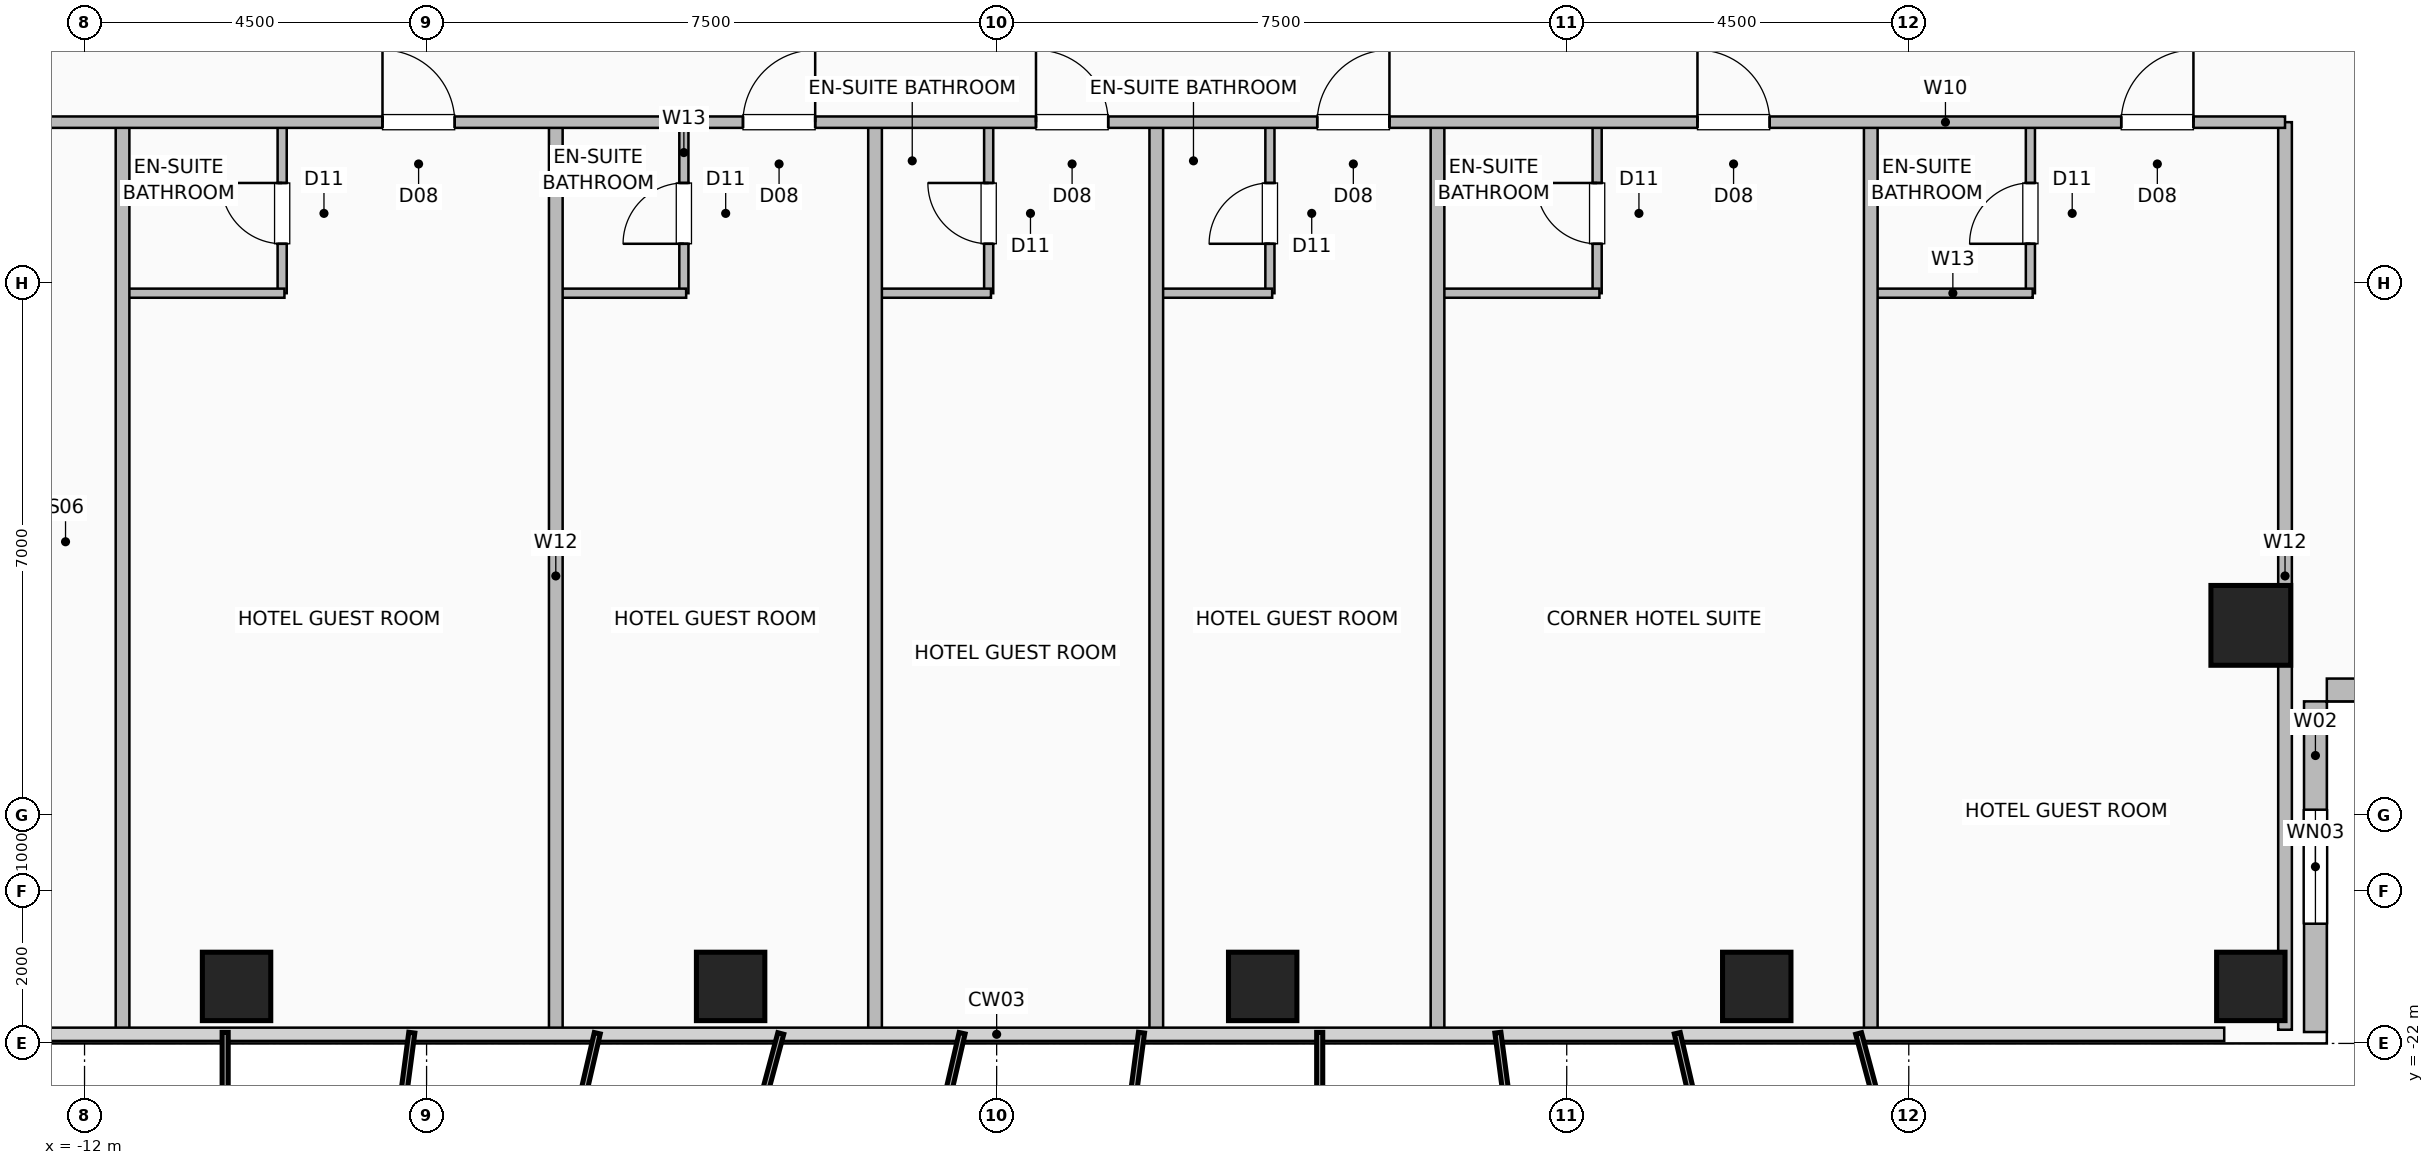
"""IFC4 building model, lengths in metres.
Left out: names, types, materials, properties, quantities, classifications, styles, units other than length and angle.
Written with IfcOpenShell. Run it as: python <this file> out.ifc"""

import sys

from ifc_helpers import new_model, si_unit, direction, frame, frame_2d, origin, origin_2d, place, context, subcontext, project, spatial, rectangle, hollow_rectangle, extrude, element, fill, save


model = new_model("IFC4")
c1 = context("Model", 3, precision=1e-05, world=origin(), true_north=direction((0.0, 1.0)))
c2 = subcontext(c1, "Body", "Model", "MODEL_VIEW")
j1 = project(units=[si_unit("LENGTHUNIT", "METRE"), si_unit("PLANEANGLEUNIT", "RADIAN")], contexts=[c1])
p1 = place(None, origin())
s1 = spatial("IfcSite", under=j1, at=p1, CompositionType="ELEMENT")
p2 = place(p1, origin())
s2 = spatial("IfcBuilding", under=s1, at=p2, CompositionType="ELEMENT")
p3 = place(p2, frame((0.0, 0.0, 148.0)))
s3 = spatial("IfcBuildingStorey", under=s2, at=p3, CompositionType="ELEMENT", Elevation=148.0)
for number, where, z_axis, x_axis in (
    (1, (-10.0, -21.25, 0.0), (0.0, 0.0, 1.0), (1.0, 0.0, 0.0)),
    (2, (-3.5, -21.25, 0.0), (0.0, 0.0, 1.0), (1.0, 0.0, 0.0)),
    (3, (3.5, -21.25, 0.0), (0.0, 0.0, 1.0), (1.0, 0.0, 0.0)),
    (4, (10.0, -21.25, 0.0), (0.0, 0.0, 1.0), (1.0, 0.0, 0.0)),
    (5, (16.5, -21.25, 0.0), (0.0, 0.0, 1.0), (1.0, 0.0, 0.0)),
):
    element("IfcColumn", number, at=place(p3, frame(where, z_axis=z_axis, x_axis=x_axis)), inside=s3, PredefinedType="COLUMN", context=c2, shape_type="SweptSolid", body=[
        extrude(hollow_rectangle(XDim=0.9, YDim=0.9, WallThickness=0.045, at=origin_2d()), origin(), (0.0, 0.0, 1.0), 3.6),
    ])
p4 = place(p3, frame((16.5, -16.5, 0.0), z_axis=(0.0, 0.0, 1.0), x_axis=(1.0, 0.0, 0.0)))
e6 = element("IfcColumn", 6, at=p4, inside=s3, PredefinedType="COLUMN", context=c2, shape_type="SweptSolid", body=[
    extrude(hollow_rectangle(XDim=1.05, YDim=1.05, WallThickness=0.05, at=origin_2d()), origin(), (0.0, 0.0, 1.0), 3.6),
])
p5 = place(p3, frame((17.35, -21.85, 0.0), z_axis=(0.0, 0.0, 1.0), x_axis=(0.0, 1.0, 0.0)))
e7 = element("IfcWall", 7, at=p5, inside=s3, PredefinedType="SOLIDWALL", context=c2, shape_type="SweptSolid", body=[
    extrude(rectangle(XDim=4.35, YDim=0.3, at=frame_2d((2.175, 0.0))), origin(), (0.0, 0.0, 1.0), 3.36),
])
p6 = place(p5, frame((1.425, 0.0, 0.9)))
e8 = element("IfcOpeningElement", 8, at=p6, cuts=e7, PredefinedType="OPENING", context=c2, shape_type="SweptSolid", body=[
    extrude(rectangle(XDim=1.5, YDim=1.8, at=frame_2d((0.75, 0.9))), frame((0.0, 0.16, 0.0), z_axis=(0.0, -1.0, 0.0), x_axis=(1.0, 0.0, 0.0)), (0.0, 0.0, 1.0), 0.32),
])
p7 = place(p3, frame((21.85, -17.35, 0.0), z_axis=(0.0, 0.0, 1.0), x_axis=(-1.0, 0.0, 0.0)))
e9 = element("IfcWall", 9, at=p7, inside=s3, PredefinedType="SOLIDWALL", context=c2, shape_type="SweptSolid", body=[
    extrude(rectangle(XDim=4.35, YDim=0.3, at=frame_2d((2.175, 0.0))), origin(), (0.0, 0.0, 1.0), 3.36),
])
p8 = place(p3, frame((-9.4, -12.13, 0.0), z_axis=(0.0, 0.0, 1.0), x_axis=(0.0, 1.0, 0.0)))
e10 = element("IfcWall", 10, at=p8, inside=s3, PredefinedType="PLUMBINGWALL", context=c2, shape_type="SweptSolid", body=[
    extrude(rectangle(XDim=2.25, YDim=0.12, at=frame_2d((1.125, 0.0))), origin(), (0.0, 0.0, 1.0), 3.36),
])
p9 = place(p8, frame((0.65, 0.0, 0.0)))
e11 = element("IfcOpeningElement", 11, at=p9, cuts=e10, PredefinedType="OPENING", context=c2, shape_type="SweptSolid", body=[
    extrude(rectangle(XDim=0.8, YDim=2.05, at=frame_2d((0.4, 1.025))), frame((0.0, 0.07, 0.0), z_axis=(0.0, -1.0, 0.0), x_axis=(1.0, 0.0, 0.0)), (0.0, 0.0, 1.0), 0.14),
])
p10 = place(p3, frame((-11.47, -12.13, 0.0), z_axis=(0.0, 0.0, 1.0), x_axis=(1.0, 0.0, 0.0)))
e12 = element("IfcWall", 12, at=p10, inside=s3, PredefinedType="PLUMBINGWALL", context=c2, shape_type="SweptSolid", body=[
    extrude(rectangle(XDim=2.1, YDim=0.12, at=frame_2d((1.05, 0.0))), origin(), (0.0, 0.0, 1.0), 3.36),
])
p11 = place(p3, frame((-4.115, -12.13, 0.0), z_axis=(0.0, 0.0, 1.0), x_axis=(0.0, 1.0, 0.0)))
e13 = element("IfcWall", 13, at=p11, inside=s3, PredefinedType="PLUMBINGWALL", context=c2, shape_type="SweptSolid", body=[
    extrude(rectangle(XDim=2.25, YDim=0.12, at=frame_2d((1.125, 0.0))), origin(), (0.0, 0.0, 1.0), 3.36),
])
p12 = place(p11, frame((0.65, 0.0, 0.0)))
e14 = element("IfcOpeningElement", 14, at=p12, cuts=e13, PredefinedType="OPENING", context=c2, shape_type="SweptSolid", body=[
    extrude(rectangle(XDim=0.8, YDim=2.05, at=frame_2d((0.4, 1.025))), frame((0.0, 0.07, 0.0), z_axis=(0.0, -1.0, 0.0), x_axis=(1.0, 0.0, 0.0)), (0.0, 0.0, 1.0), 0.14),
])
p13 = place(p3, frame((-5.77, -12.13, 0.0), z_axis=(0.0, 0.0, 1.0), x_axis=(1.0, 0.0, 0.0)))
e15 = element("IfcWall", 15, at=p13, inside=s3, PredefinedType="PLUMBINGWALL", context=c2, shape_type="SweptSolid", body=[
    extrude(rectangle(XDim=1.685, YDim=0.12, at=frame_2d((0.843, 0.0))), origin(), (0.0, 0.0, 1.0), 3.36),
])
p14 = place(p3, frame((-0.105, -12.13, 0.0), z_axis=(0.0, 0.0, 1.0), x_axis=(0.0, 1.0, 0.0)))
e16 = element("IfcWall", 16, at=p14, inside=s3, PredefinedType="PLUMBINGWALL", context=c2, shape_type="SweptSolid", body=[
    extrude(rectangle(XDim=2.25, YDim=0.12, at=frame_2d((1.125, 0.0))), origin(), (0.0, 0.0, 1.0), 3.36),
])
p15 = place(p14, frame((0.65, 0.0, 0.0)))
e17 = element("IfcOpeningElement", 17, at=p15, cuts=e16, PredefinedType="OPENING", context=c2, shape_type="SweptSolid", body=[
    extrude(rectangle(XDim=0.8, YDim=2.05, at=frame_2d((0.4, 1.025))), frame((0.0, 0.07, 0.0), z_axis=(0.0, -1.0, 0.0), x_axis=(1.0, 0.0, 0.0)), (0.0, 0.0, 1.0), 0.14),
])
p16 = place(p3, frame((-1.57, -12.13, 0.0), z_axis=(0.0, 0.0, 1.0), x_axis=(1.0, 0.0, 0.0)))
e18 = element("IfcWall", 18, at=p16, inside=s3, PredefinedType="PLUMBINGWALL", context=c2, shape_type="SweptSolid", body=[
    extrude(rectangle(XDim=1.495, YDim=0.12, at=frame_2d((0.748, 0.0))), origin(), (0.0, 0.0, 1.0), 3.36),
])
p17 = place(p3, frame((3.595, -12.13, 0.0), z_axis=(0.0, 0.0, 1.0), x_axis=(0.0, 1.0, 0.0)))
e19 = element("IfcWall", 19, at=p17, inside=s3, PredefinedType="PLUMBINGWALL", context=c2, shape_type="SweptSolid", body=[
    extrude(rectangle(XDim=2.25, YDim=0.12, at=frame_2d((1.125, 0.0))), origin(), (0.0, 0.0, 1.0), 2.718),
])
p18 = place(p17, frame((0.65, 0.0, 0.0)))
e20 = element("IfcOpeningElement", 20, at=p18, cuts=e19, PredefinedType="OPENING", context=c2, shape_type="SweptSolid", body=[
    extrude(rectangle(XDim=0.8, YDim=2.05, at=frame_2d((0.4, 1.025))), frame((0.0, 0.07, 0.0), z_axis=(0.0, -1.0, 0.0), x_axis=(1.0, 0.0, 0.0)), (0.0, 0.0, 1.0), 0.14),
])
p19 = place(p3, frame((2.13, -12.13, 0.0), z_axis=(0.0, 0.0, 1.0), x_axis=(1.0, 0.0, 0.0)))
e21 = element("IfcWall", 21, at=p19, inside=s3, PredefinedType="PLUMBINGWALL", context=c2, shape_type="SweptSolid", body=[
    extrude(rectangle(XDim=1.495, YDim=0.12, at=frame_2d((0.748, 0.0))), origin(), (0.0, 0.0, 1.0), 3.36),
])
p20 = place(p3, frame((7.9, -12.13, 0.0), z_axis=(0.0, 0.0, 1.0), x_axis=(0.0, 1.0, 0.0)))
e22 = element("IfcWall", 22, at=p20, inside=s3, PredefinedType="PLUMBINGWALL", context=c2, shape_type="SweptSolid", body=[
    extrude(rectangle(XDim=2.25, YDim=0.12, at=frame_2d((1.125, 0.0))), origin(), (0.0, 0.0, 1.0), 3.36),
])
p21 = place(p20, frame((0.65, 0.0, 0.0)))
e23 = element("IfcOpeningElement", 23, at=p21, cuts=e22, PredefinedType="OPENING", context=c2, shape_type="SweptSolid", body=[
    extrude(rectangle(XDim=0.8, YDim=2.05, at=frame_2d((0.4, 1.025))), frame((0.0, 0.07, 0.0), z_axis=(0.0, -1.0, 0.0), x_axis=(1.0, 0.0, 0.0)), (0.0, 0.0, 1.0), 0.14),
])
p22 = place(p3, frame((5.83, -12.13, 0.0), z_axis=(0.0, 0.0, 1.0), x_axis=(1.0, 0.0, 0.0)))
e24 = element("IfcWall", 24, at=p22, inside=s3, PredefinedType="PLUMBINGWALL", context=c2, shape_type="SweptSolid", body=[
    extrude(rectangle(XDim=2.1, YDim=0.12, at=frame_2d((1.05, 0.0))), origin(), (0.0, 0.0, 1.0), 3.36),
])
p23 = place(p3, frame((13.6, -12.13, 0.0), z_axis=(0.0, 0.0, 1.0), x_axis=(0.0, 1.0, 0.0)))
e25 = element("IfcWall", 25, at=p23, inside=s3, PredefinedType="PLUMBINGWALL", context=c2, shape_type="SweptSolid", body=[
    extrude(rectangle(XDim=2.25, YDim=0.12, at=frame_2d((1.125, 0.0))), origin(), (0.0, 0.0, 1.0), 3.36),
])
p24 = place(p23, frame((0.65, 0.0, 0.0)))
e26 = element("IfcOpeningElement", 26, at=p24, cuts=e25, PredefinedType="OPENING", context=c2, shape_type="SweptSolid", body=[
    extrude(rectangle(XDim=0.8, YDim=2.05, at=frame_2d((0.4, 1.025))), frame((0.0, 0.07, 0.0), z_axis=(0.0, -1.0, 0.0), x_axis=(1.0, 0.0, 0.0)), (0.0, 0.0, 1.0), 0.14),
])
p25 = place(p3, frame((11.53, -12.13, 0.0), z_axis=(0.0, 0.0, 1.0), x_axis=(1.0, 0.0, 0.0)))
e27 = element("IfcWall", 27, at=p25, inside=s3, PredefinedType="PLUMBINGWALL", context=c2, shape_type="SweptSolid", body=[
    extrude(rectangle(XDim=2.1, YDim=0.12, at=frame_2d((1.05, 0.0))), origin(), (0.0, 0.0, 1.0), 3.36),
])
for number, where, z_axis, x_axis in (
    (28, (-11.5, -21.82, 0.0), (0.0, 0.0, 1.0), (0.0, 1.0, 0.0)),
    (29, (-5.8, -21.82, 0.0), (0.0, 0.0, 1.0), (0.0, 1.0, 0.0)),
    (30, (-1.6, -21.82, 0.0), (0.0, 0.0, 1.0), (0.0, 1.0, 0.0)),
    (31, (2.1, -21.82, 0.0), (0.0, 0.0, 1.0), (0.0, 1.0, 0.0)),
    (32, (5.8, -21.82, 0.0), (0.0, 0.0, 1.0), (0.0, 1.0, 0.0)),
    (33, (11.5, -21.82, 0.0), (0.0, 0.0, 1.0), (0.0, 1.0, 0.0)),
    (34, (16.95, -21.82, 0.0), (0.0, 0.0, 1.0), (0.0, 1.0, 0.0)),
):
    element("IfcWall", number, at=place(p3, frame(where, z_axis=z_axis, x_axis=x_axis)), inside=s3, PredefinedType="PARTITIONING", context=c2, shape_type="SweptSolid", body=[
        extrude(rectangle(XDim=11.94, YDim=0.18, at=frame_2d((5.97, 0.0))), origin(), (0.0, 0.0, 1.0), 3.36),
    ])
p26 = place(p3, frame((-16.95, -9.88, 0.0), z_axis=(0.0, 0.0, 1.0), x_axis=(1.0, 0.0, 0.0)))
e35 = element("IfcWall", 35, at=p26, inside=s3, PredefinedType="PARTITIONING", context=c2, shape_type="SweptSolid", body=[
    extrude(rectangle(XDim=33.9, YDim=0.15, at=frame_2d((16.95, 0.0))), origin(), (0.0, 0.0, 1.0), 3.36),
])
p27 = place(p26, frame((3.295, 0.0, 0.0)))
e36 = element("IfcOpeningElement", 36, at=p27, cuts=e35, PredefinedType="OPENING", context=c2, shape_type="SweptSolid", body=[
    extrude(rectangle(XDim=0.95, YDim=2.08, at=frame_2d((0.475, 1.04))), frame((0.0, 0.085, 0.0), z_axis=(0.0, -1.0, 0.0), x_axis=(1.0, 0.0, 0.0)), (0.0, 0.0, 1.0), 0.17),
])
p28 = place(p26, frame((8.87, 0.0, 0.0)))
e37 = element("IfcOpeningElement", 37, at=p28, cuts=e35, PredefinedType="OPENING", context=c2, shape_type="SweptSolid", body=[
    extrude(rectangle(XDim=0.95, YDim=2.08, at=frame_2d((0.475, 1.04))), frame((0.0, 0.085, 0.0), z_axis=(0.0, -1.0, 0.0), x_axis=(1.0, 0.0, 0.0)), (0.0, 0.0, 1.0), 0.17),
])
p29 = place(p26, frame((13.613, 0.0, 0.0)))
e38 = element("IfcOpeningElement", 38, at=p29, cuts=e35, PredefinedType="OPENING", context=c2, shape_type="SweptSolid", body=[
    extrude(rectangle(XDim=0.95, YDim=2.08, at=frame_2d((0.475, 1.04))), frame((0.0, 0.085, 0.0), z_axis=(0.0, -1.0, 0.0), x_axis=(1.0, 0.0, 0.0)), (0.0, 0.0, 1.0), 0.17),
])
p30 = place(p26, frame((17.468, 0.0, 0.0)))
e39 = element("IfcOpeningElement", 39, at=p30, cuts=e35, PredefinedType="OPENING", context=c2, shape_type="SweptSolid", body=[
    extrude(rectangle(XDim=0.95, YDim=2.08, at=frame_2d((0.475, 1.04))), frame((0.0, 0.085, 0.0), z_axis=(0.0, -1.0, 0.0), x_axis=(1.0, 0.0, 0.0)), (0.0, 0.0, 1.0), 0.17),
])
p31 = place(p26, frame((21.167, 0.0, 0.0)))
e40 = element("IfcOpeningElement", 40, at=p31, cuts=e35, PredefinedType="OPENING", context=c2, shape_type="SweptSolid", body=[
    extrude(rectangle(XDim=0.95, YDim=2.08, at=frame_2d((0.475, 1.04))), frame((0.0, 0.085, 0.0), z_axis=(0.0, -1.0, 0.0), x_axis=(1.0, 0.0, 0.0)), (0.0, 0.0, 1.0), 0.17),
])
p32 = place(p26, frame((26.17, 0.0, 0.0)))
e41 = element("IfcOpeningElement", 41, at=p32, cuts=e35, PredefinedType="OPENING", context=c2, shape_type="SweptSolid", body=[
    extrude(rectangle(XDim=0.95, YDim=2.08, at=frame_2d((0.475, 1.04))), frame((0.0, 0.085, 0.0), z_axis=(0.0, -1.0, 0.0), x_axis=(1.0, 0.0, 0.0)), (0.0, 0.0, 1.0), 0.17),
])
p33 = place(p26, frame((31.745, 0.0, 0.0)))
e42 = element("IfcOpeningElement", 42, at=p33, cuts=e35, PredefinedType="OPENING", context=c2, shape_type="SweptSolid", body=[
    extrude(rectangle(XDim=0.95, YDim=2.08, at=frame_2d((0.475, 1.04))), frame((0.0, 0.085, 0.0), z_axis=(0.0, -1.0, 0.0), x_axis=(1.0, 0.0, 0.0)), (0.0, 0.0, 1.0), 0.17),
])
p34 = place(p6, origin())
e43 = element("IfcWindow", 43, at=p34, inside=s3, PartitioningType="SINGLE_PANEL", PredefinedType="WINDOW", context=c2, shape_type="SweptSolid", body=[
    extrude(rectangle(XDim=1.5, YDim=1.8, at=frame_2d((0.75, 0.9))), frame((0.0, 0.03, 0.0), z_axis=(0.0, -1.0, 0.0), x_axis=(1.0, 0.0, 0.0)), (0.0, 0.0, 1.0), 0.06),
])
fill(e8, e43)
p35 = place(p9, origin())
e44 = element("IfcDoor", 44, at=p35, inside=s3, OperationType="SINGLE_SWING_RIGHT", PredefinedType="DOOR", context=c2, shape_type="SweptSolid", body=[
    extrude(rectangle(XDim=0.8, YDim=2.05, at=frame_2d((0.4, 1.025))), frame((0.0, 0.025, 0.0), z_axis=(0.0, -1.0, 0.0), x_axis=(1.0, 0.0, 0.0)), (0.0, 0.0, 1.0), 0.05),
])
fill(e11, e44)
p36 = place(p12, origin())
e45 = element("IfcDoor", 45, at=p36, inside=s3, OperationType="SINGLE_SWING_LEFT", PredefinedType="DOOR", context=c2, shape_type="SweptSolid", body=[
    extrude(rectangle(XDim=0.8, YDim=2.05, at=frame_2d((0.4, 1.025))), frame((0.0, 0.025, 0.0), z_axis=(0.0, -1.0, 0.0), x_axis=(1.0, 0.0, 0.0)), (0.0, 0.0, 1.0), 0.05),
])
fill(e14, e45)
p37 = place(p15, origin())
e46 = element("IfcDoor", 46, at=p37, inside=s3, OperationType="SINGLE_SWING_RIGHT", PredefinedType="DOOR", context=c2, shape_type="SweptSolid", body=[
    extrude(rectangle(XDim=0.8, YDim=2.05, at=frame_2d((0.4, 1.025))), frame((0.0, 0.025, 0.0), z_axis=(0.0, -1.0, 0.0), x_axis=(1.0, 0.0, 0.0)), (0.0, 0.0, 1.0), 0.05),
])
fill(e17, e46)
p38 = place(p18, origin())
e47 = element("IfcDoor", 47, at=p38, inside=s3, OperationType="SINGLE_SWING_LEFT", PredefinedType="DOOR", context=c2, shape_type="SweptSolid", body=[
    extrude(rectangle(XDim=0.8, YDim=2.05, at=frame_2d((0.4, 1.025))), frame((0.0, 0.025, 0.0), z_axis=(0.0, -1.0, 0.0), x_axis=(1.0, 0.0, 0.0)), (0.0, 0.0, 1.0), 0.05),
])
fill(e20, e47)
p39 = place(p21, origin())
e48 = element("IfcDoor", 48, at=p39, inside=s3, OperationType="SINGLE_SWING_RIGHT", PredefinedType="DOOR", context=c2, shape_type="SweptSolid", body=[
    extrude(rectangle(XDim=0.8, YDim=2.05, at=frame_2d((0.4, 1.025))), frame((0.0, 0.025, 0.0), z_axis=(0.0, -1.0, 0.0), x_axis=(1.0, 0.0, 0.0)), (0.0, 0.0, 1.0), 0.05),
])
fill(e23, e48)
p40 = place(p24, origin())
e49 = element("IfcDoor", 49, at=p40, inside=s3, OperationType="SINGLE_SWING_LEFT", PredefinedType="DOOR", context=c2, shape_type="SweptSolid", body=[
    extrude(rectangle(XDim=0.8, YDim=2.05, at=frame_2d((0.4, 1.025))), frame((0.0, 0.025, 0.0), z_axis=(0.0, -1.0, 0.0), x_axis=(1.0, 0.0, 0.0)), (0.0, 0.0, 1.0), 0.05),
])
fill(e26, e49)
p41 = place(p28, origin())
e50 = element("IfcDoor", 50, at=p41, inside=s3, OperationType="SINGLE_SWING_LEFT", PredefinedType="DOOR", context=c2, shape_type="SweptSolid", body=[
    extrude(rectangle(XDim=0.95, YDim=2.08, at=frame_2d((0.475, 1.04))), frame((0.0, 0.025, 0.0), z_axis=(0.0, -1.0, 0.0), x_axis=(1.0, 0.0, 0.0)), (0.0, 0.0, 1.0), 0.05),
])
fill(e37, e50)
p42 = place(p29, origin())
e51 = element("IfcDoor", 51, at=p42, inside=s3, OperationType="SINGLE_SWING_RIGHT", PredefinedType="DOOR", context=c2, shape_type="SweptSolid", body=[
    extrude(rectangle(XDim=0.95, YDim=2.08, at=frame_2d((0.475, 1.04))), frame((0.0, 0.025, 0.0), z_axis=(0.0, -1.0, 0.0), x_axis=(1.0, 0.0, 0.0)), (0.0, 0.0, 1.0), 0.05),
])
fill(e38, e51)
p43 = place(p30, origin())
e52 = element("IfcDoor", 52, at=p43, inside=s3, OperationType="SINGLE_SWING_LEFT", PredefinedType="DOOR", context=c2, shape_type="SweptSolid", body=[
    extrude(rectangle(XDim=0.95, YDim=2.08, at=frame_2d((0.475, 1.04))), frame((0.0, 0.025, 0.0), z_axis=(0.0, -1.0, 0.0), x_axis=(1.0, 0.0, 0.0)), (0.0, 0.0, 1.0), 0.05),
])
fill(e39, e52)
p44 = place(p31, origin())
e53 = element("IfcDoor", 53, at=p44, inside=s3, OperationType="SINGLE_SWING_RIGHT", PredefinedType="DOOR", context=c2, shape_type="SweptSolid", body=[
    extrude(rectangle(XDim=0.95, YDim=2.08, at=frame_2d((0.475, 1.04))), frame((0.0, 0.025, 0.0), z_axis=(0.0, -1.0, 0.0), x_axis=(1.0, 0.0, 0.0)), (0.0, 0.0, 1.0), 0.05),
])
fill(e40, e53)
p45 = place(p32, origin())
e54 = element("IfcDoor", 54, at=p45, inside=s3, OperationType="SINGLE_SWING_LEFT", PredefinedType="DOOR", context=c2, shape_type="SweptSolid", body=[
    extrude(rectangle(XDim=0.95, YDim=2.08, at=frame_2d((0.475, 1.04))), frame((0.0, 0.025, 0.0), z_axis=(0.0, -1.0, 0.0), x_axis=(1.0, 0.0, 0.0)), (0.0, 0.0, 1.0), 0.05),
])
fill(e41, e54)
p46 = place(p33, origin())
e55 = element("IfcDoor", 55, at=p46, inside=s3, OperationType="SINGLE_SWING_RIGHT", PredefinedType="DOOR", context=c2, shape_type="SweptSolid", body=[
    extrude(rectangle(XDim=0.95, YDim=2.08, at=frame_2d((0.475, 1.04))), frame((0.0, 0.025, 0.0), z_axis=(0.0, -1.0, 0.0), x_axis=(1.0, 0.0, 0.0)), (0.0, 0.0, 1.0), 0.05),
])
fill(e42, e55)
save(model, sys.argv[1])
